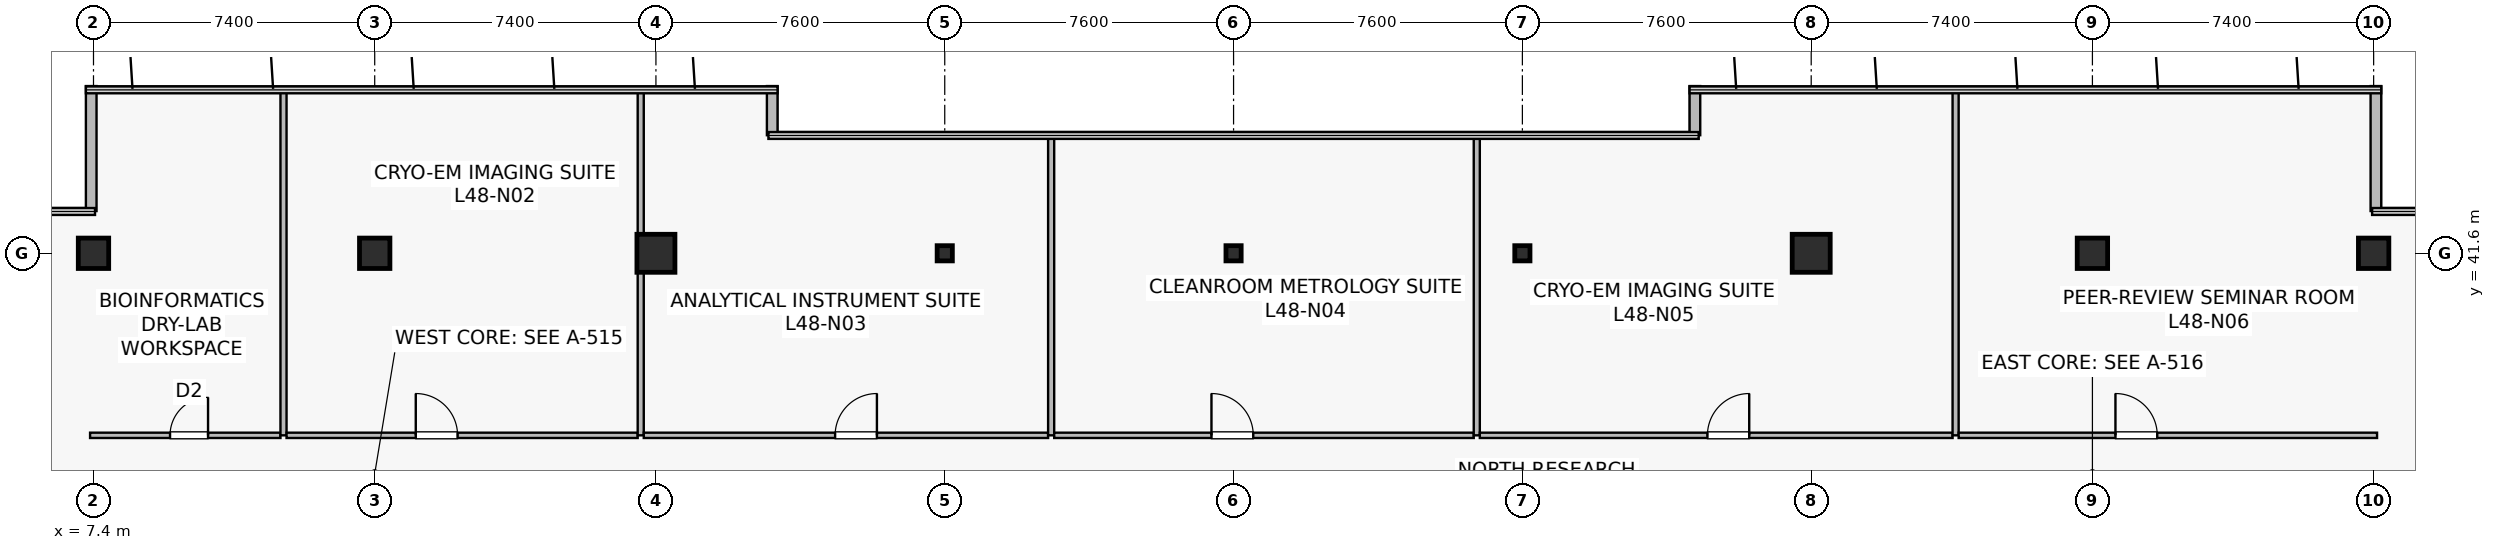
"""IFC4 building model, lengths in metres.
Left out: names, types, materials, properties, quantities, classifications, styles, units other than length and angle.
Written with IfcOpenShell. Run it as: python <this file> out.ifc"""

import sys

from ifc_helpers import new_model, si_unit, direction, frame, frame_2d, origin, origin_2d, place, context, subcontext, project, spatial, rectangle, hollow_rectangle, extrude, source, transform, mapped, element, fill, save


model = new_model("IFC4")
c1 = context("Model", 3, precision=1e-05, world=origin(), true_north=direction((0.0, 1.0)))
c2 = subcontext(c1, "Body", "Model", "MODEL_VIEW")
j1 = project(units=[si_unit("LENGTHUNIT", "METRE"), si_unit("PLANEANGLEUNIT", "RADIAN")], contexts=[c1])
p1 = place(None, origin())
s1 = spatial("IfcSite", under=j1, at=p1, CompositionType="ELEMENT")
p2 = place(p1, origin())
s2 = spatial("IfcBuilding", under=s1, at=p2, CompositionType="ELEMENT")
p3 = place(p2, frame((0.0, 0.0, 201.4)))
s3 = spatial("IfcBuildingStorey", under=s2, at=p3, CompositionType="ELEMENT", Elevation=201.4)
m1 = source(origin(), c2, "Body", "SweptSolid", [
    extrude(rectangle(XDim=0.8, YDim=0.8, at=origin_2d()), origin(), (0.0, 0.0, 1.0), 4.1),
])
p4 = place(p3, frame((14.8, 41.6, 0.0), z_axis=(0.0, 0.0, 1.0), x_axis=(1.0, 0.0, 0.0)))
e1 = element("IfcColumn", 1, at=p4, inside=s3, PredefinedType="COLUMN", context=c2, shape_type="MappedRepresentation", body=[
    mapped(m1, transform((0.0, 0.0, 0.0), scale=1.0)),
])
m2 = source(origin(), c2, "Body", "SweptSolid", [
    extrude(rectangle(XDim=1.0, YDim=1.0, at=origin_2d()), origin(), (0.0, 0.0, 1.0), 4.1),
])
for number, where, z_axis, x_axis in (
    (2, (22.2, 41.6, 0.0), (0.0, 0.0, 1.0), (1.0, 0.0, 0.0)),
    (3, (52.6, 41.6, 0.0), (0.0, 0.0, 1.0), (1.0, 0.0, 0.0)),
):
    element("IfcColumn", number, at=place(p3, frame(where, z_axis=z_axis, x_axis=x_axis)), inside=s3, PredefinedType="COLUMN", context=c2, shape_type="MappedRepresentation", body=[
        mapped(m2, transform((0.0, 0.0, 0.0), scale=1.0)),
    ])
for number, where, z_axis, x_axis in (
    (4, (60.0, 41.6, 0.0), (0.0, 0.0, 1.0), (1.0, 0.0, 0.0)),
    (5, (7.4, 41.6, 0.0), (0.0, 0.0, 1.0), (1.0, 0.0, 0.0)),
    (6, (67.4, 41.6, 0.0), (0.0, 0.0, 1.0), (1.0, 0.0, 0.0)),
):
    element("IfcColumn", number, at=place(p3, frame(where, z_axis=z_axis, x_axis=x_axis)), inside=s3, PredefinedType="COLUMN", context=c2, shape_type="MappedRepresentation", body=[
        mapped(m1, transform((0.0, 0.0, 0.0), scale=1.0)),
    ])
m3 = source(origin(), c2, "Body", "SweptSolid", [
    extrude(hollow_rectangle(XDim=0.4, YDim=0.4, WallThickness=0.019, at=origin_2d()), origin(), (0.0, 0.0, 1.0), 4.1),
])
for number, where, z_axis, x_axis in (
    (7, (29.8, 41.6, 0.0), (0.0, 0.0, 1.0), (1.0, 0.0, 0.0)),
    (8, (37.4, 41.6, 0.0), (0.0, 0.0, 1.0), (1.0, 0.0, 0.0)),
    (9, (45.0, 41.6, 0.0), (0.0, 0.0, 1.0), (1.0, 0.0, 0.0)),
):
    element("IfcColumn", number, at=place(p3, frame(where, z_axis=z_axis, x_axis=x_axis)), inside=s3, PredefinedType="COLUMN", context=c2, shape_type="MappedRepresentation", body=[
        mapped(m3, transform((0.0, 0.0, 0.0), scale=1.0)),
    ])
p5 = place(p3, frame((67.46, 42.712, 0.0), z_axis=(0.0, 0.0, 1.0), x_axis=(0.0, 1.0, 0.0)))
e10 = element("IfcWall", 10, at=p5, inside=s3, PredefinedType="STANDARD", context=c2, shape_type="SweptSolid", body=[
    extrude(rectangle(XDim=3.288, YDim=0.28, at=frame_2d((1.644, 0.0))), origin(), (0.0, 0.0, 1.0), 3.8),
])
for number, where, z_axis, x_axis in (
    (11, (49.54, 46.0, 0.0), (0.0, 0.0, 1.0), (0.0, -1.0, 0.0)),
    (12, (25.26, 44.707, 0.0), (0.0, 0.0, 1.0), (0.0, 1.0, 0.0)),
):
    element("IfcWall", number, at=place(p3, frame(where, z_axis=z_axis, x_axis=x_axis)), inside=s3, PredefinedType="STANDARD", context=c2, shape_type="SweptSolid", body=[
        extrude(rectangle(XDim=1.293, YDim=0.28, at=frame_2d((0.646, 0.0))), origin(), (0.0, 0.0, 1.0), 3.8),
    ])
p6 = place(p3, frame((7.34, 46.0, 0.0), z_axis=(0.0, 0.0, 1.0), x_axis=(0.0, -1.0, 0.0)))
e13 = element("IfcWall", 13, at=p6, inside=s3, PredefinedType="STANDARD", context=c2, shape_type="SweptSolid", body=[
    extrude(rectangle(XDim=3.288, YDim=0.28, at=frame_2d((1.644, 0.0))), origin(), (0.0, 0.0, 1.0), 3.8),
])
p7 = place(p3, frame((7.31, 36.81, 0.0), z_axis=(0.0, 0.0, 1.0), x_axis=(1.0, 0.0, 0.0)))
e14 = element("IfcWall", 14, at=p7, inside=s3, PredefinedType="PARTITIONING", context=c2, shape_type="SweptSolid", body=[
    extrude(rectangle(XDim=5.01, YDim=0.14, at=frame_2d((2.505, 0.0))), origin(), (0.0, 0.0, 1.0), 3.335),
])
p8 = place(p7, frame((2.104, 0.0, 0.0)))
e15 = element("IfcOpeningElement", 15, at=p8, cuts=e14, PredefinedType="OPENING", context=c2, shape_type="SweptSolid", body=[
    extrude(rectangle(XDim=1.0, YDim=2.15, at=frame_2d((0.5, 1.075))), frame((0.0, 0.08, 0.0), z_axis=(0.0, -1.0, 0.0), x_axis=(1.0, 0.0, 0.0)), (0.0, 0.0, 1.0), 0.16),
])
p9 = place(p3, frame((12.4, 36.81, 0.0), z_axis=(0.0, 0.0, 1.0), x_axis=(0.0, 1.0, 0.0)))
e16 = element("IfcWall", 16, at=p9, inside=s3, PredefinedType="PARTITIONING", context=c2, shape_type="SweptSolid", body=[
    extrude(rectangle(XDim=9.08, YDim=0.16, at=frame_2d((4.54, 0.0))), origin(), (0.0, 0.0, 1.0), 3.135),
])
p10 = place(p3, frame((12.48, 36.81, 0.0), z_axis=(0.0, 0.0, 1.0), x_axis=(1.0, 0.0, 0.0)))
e17 = element("IfcWall", 17, at=p10, inside=s3, PredefinedType="PARTITIONING", context=c2, shape_type="SweptSolid", body=[
    extrude(rectangle(XDim=9.24, YDim=0.14, at=frame_2d((4.62, 0.0))), origin(), (0.0, 0.0, 1.0), 3.197),
])
p11 = place(p10, frame((3.4, 0.0, 0.0)))
e18 = element("IfcOpeningElement", 18, at=p11, cuts=e17, PredefinedType="OPENING", context=c2, shape_type="SweptSolid", body=[
    extrude(rectangle(XDim=1.1, YDim=2.18, at=frame_2d((0.55, 1.09))), frame((0.0, 0.08, 0.0), z_axis=(0.0, -1.0, 0.0), x_axis=(1.0, 0.0, 0.0)), (0.0, 0.0, 1.0), 0.16),
])
p12 = place(p3, frame((21.8, 36.81, 0.0), z_axis=(0.0, 0.0, 1.0), x_axis=(0.0, 1.0, 0.0)))
e19 = element("IfcWall", 19, at=p12, inside=s3, PredefinedType="PARTITIONING", context=c2, shape_type="SweptSolid", body=[
    extrude(rectangle(XDim=9.08, YDim=0.16, at=frame_2d((4.54, 0.0))), origin(), (0.0, 0.0, 1.0), 3.135),
])
p13 = place(p3, frame((21.88, 36.81, 0.0), z_axis=(0.0, 0.0, 1.0), x_axis=(1.0, 0.0, 0.0)))
e20 = element("IfcWall", 20, at=p13, inside=s3, PredefinedType="PARTITIONING", context=c2, shape_type="SweptSolid", body=[
    extrude(rectangle(XDim=10.64, YDim=0.14, at=frame_2d((5.32, 0.0))), origin(), (0.0, 0.0, 1.0), 3.197),
])
p14 = place(p13, frame((5.035, 0.0, 0.0)))
e21 = element("IfcOpeningElement", 21, at=p14, cuts=e20, PredefinedType="OPENING", context=c2, shape_type="SweptSolid", body=[
    extrude(rectangle(XDim=1.1, YDim=2.18, at=frame_2d((0.55, 1.09))), frame((0.0, 0.08, 0.0), z_axis=(0.0, -1.0, 0.0), x_axis=(1.0, 0.0, 0.0)), (0.0, 0.0, 1.0), 0.16),
])
p15 = place(p3, frame((32.6, 36.81, 0.0), z_axis=(0.0, 0.0, 1.0), x_axis=(0.0, 1.0, 0.0)))
e22 = element("IfcWall", 22, at=p15, inside=s3, PredefinedType="PARTITIONING", context=c2, shape_type="SweptSolid", body=[
    extrude(rectangle(XDim=7.88, YDim=0.16, at=frame_2d((3.94, 0.0))), origin(), (0.0, 0.0, 1.0), 3.135),
])
p16 = place(p3, frame((32.68, 36.81, 0.0), z_axis=(0.0, 0.0, 1.0), x_axis=(1.0, 0.0, 0.0)))
e23 = element("IfcWall", 23, at=p16, inside=s3, PredefinedType="PARTITIONING", context=c2, shape_type="SweptSolid", body=[
    extrude(rectangle(XDim=11.04, YDim=0.14, at=frame_2d((5.52, 0.0))), origin(), (0.0, 0.0, 1.0), 3.197),
])
p17 = place(p16, frame((4.138, 0.0, 0.0)))
e24 = element("IfcOpeningElement", 24, at=p17, cuts=e23, PredefinedType="OPENING", context=c2, shape_type="SweptSolid", body=[
    extrude(rectangle(XDim=1.1, YDim=2.18, at=frame_2d((0.55, 1.09))), frame((0.0, 0.08, 0.0), z_axis=(0.0, -1.0, 0.0), x_axis=(1.0, 0.0, 0.0)), (0.0, 0.0, 1.0), 0.16),
])
p18 = place(p3, frame((43.8, 36.81, 0.0), z_axis=(0.0, 0.0, 1.0), x_axis=(0.0, 1.0, 0.0)))
e25 = element("IfcWall", 25, at=p18, inside=s3, PredefinedType="PARTITIONING", context=c2, shape_type="SweptSolid", body=[
    extrude(rectangle(XDim=7.88, YDim=0.16, at=frame_2d((3.94, 0.0))), origin(), (0.0, 0.0, 1.0), 3.135),
])
p19 = place(p3, frame((43.88, 36.81, 0.0), z_axis=(0.0, 0.0, 1.0), x_axis=(1.0, 0.0, 0.0)))
e26 = element("IfcWall", 26, at=p19, inside=s3, PredefinedType="PARTITIONING", context=c2, shape_type="SweptSolid", body=[
    extrude(rectangle(XDim=12.44, YDim=0.14, at=frame_2d((6.22, 0.0))), origin(), (0.0, 0.0, 1.0), 3.197),
])
p20 = place(p19, frame((5.989, 0.0, 0.0)))
e27 = element("IfcOpeningElement", 27, at=p20, cuts=e26, PredefinedType="OPENING", context=c2, shape_type="SweptSolid", body=[
    extrude(rectangle(XDim=1.1, YDim=2.18, at=frame_2d((0.55, 1.09))), frame((0.0, 0.08, 0.0), z_axis=(0.0, -1.0, 0.0), x_axis=(1.0, 0.0, 0.0)), (0.0, 0.0, 1.0), 0.16),
])
p21 = place(p3, frame((56.4, 36.81, 0.0), z_axis=(0.0, 0.0, 1.0), x_axis=(0.0, 1.0, 0.0)))
e28 = element("IfcWall", 28, at=p21, inside=s3, PredefinedType="PARTITIONING", context=c2, shape_type="SweptSolid", body=[
    extrude(rectangle(XDim=9.08, YDim=0.16, at=frame_2d((4.54, 0.0))), origin(), (0.0, 0.0, 1.0), 3.135),
])
p22 = place(p3, frame((56.48, 36.81, 0.0), z_axis=(0.0, 0.0, 1.0), x_axis=(1.0, 0.0, 0.0)))
e29 = element("IfcWall", 29, at=p22, inside=s3, PredefinedType="PARTITIONING", context=c2, shape_type="SweptSolid", body=[
    extrude(rectangle(XDim=11.01, YDim=0.14, at=frame_2d((5.505, 0.0))), origin(), (0.0, 0.0, 1.0), 3.197),
])
p23 = place(p22, frame((4.126, 0.0, 0.0)))
e30 = element("IfcOpeningElement", 30, at=p23, cuts=e29, PredefinedType="OPENING", context=c2, shape_type="SweptSolid", body=[
    extrude(rectangle(XDim=1.1, YDim=2.18, at=frame_2d((0.55, 1.09))), frame((0.0, 0.08, 0.0), z_axis=(0.0, -1.0, 0.0), x_axis=(1.0, 0.0, 0.0)), (0.0, 0.0, 1.0), 0.16),
])
m4 = source(origin(), c2, "Body", "SweptSolid", [
    extrude(rectangle(XDim=1.0, YDim=2.15, at=frame_2d((0.5, 1.075))), frame((0.0, 0.025, 0.0), z_axis=(0.0, -1.0, 0.0), x_axis=(1.0, 0.0, 0.0)), (0.0, 0.0, 1.0), 0.05),
])
p24 = place(p8, origin())
e31 = element("IfcDoor", 31, at=p24, inside=s3, OperationType="SINGLE_SWING_RIGHT", PredefinedType="DOOR", context=c2, shape_type="MappedRepresentation", body=[
    mapped(m4, transform((0.0, 0.0, 0.0), scale=1.0)),
])
fill(e15, e31)
m5 = source(origin(), c2, "Body", "SweptSolid", [
    extrude(rectangle(XDim=1.1, YDim=2.18, at=frame_2d((0.55, 1.09))), frame((0.0, 0.025, 0.0), z_axis=(0.0, -1.0, 0.0), x_axis=(1.0, 0.0, 0.0)), (0.0, 0.0, 1.0), 0.05),
])
p25 = place(p11, origin())
e32 = element("IfcDoor", 32, at=p25, inside=s3, OperationType="SINGLE_SWING_LEFT", PredefinedType="DOOR", context=c2, shape_type="MappedRepresentation", body=[
    mapped(m5, transform((0.0, 0.0, 0.0), scale=1.0)),
])
fill(e18, e32)
p26 = place(p14, origin())
e33 = element("IfcDoor", 33, at=p26, inside=s3, OperationType="SINGLE_SWING_RIGHT", PredefinedType="DOOR", context=c2, shape_type="MappedRepresentation", body=[
    mapped(m5, transform((0.0, 0.0, 0.0), scale=1.0)),
])
fill(e21, e33)
p27 = place(p17, origin())
e34 = element("IfcDoor", 34, at=p27, inside=s3, OperationType="SINGLE_SWING_LEFT", PredefinedType="DOOR", context=c2, shape_type="MappedRepresentation", body=[
    mapped(m5, transform((0.0, 0.0, 0.0), scale=1.0)),
])
fill(e24, e34)
p28 = place(p20, origin())
e35 = element("IfcDoor", 35, at=p28, inside=s3, OperationType="SINGLE_SWING_RIGHT", PredefinedType="DOOR", context=c2, shape_type="MappedRepresentation", body=[
    mapped(m5, transform((0.0, 0.0, 0.0), scale=1.0)),
])
fill(e27, e35)
p29 = place(p23, origin())
e36 = element("IfcDoor", 36, at=p29, inside=s3, OperationType="SINGLE_SWING_LEFT", PredefinedType="DOOR", context=c2, shape_type="MappedRepresentation", body=[
    mapped(m5, transform((0.0, 0.0, 0.0), scale=1.0)),
])
fill(e30, e36)
save(model, sys.argv[1])
